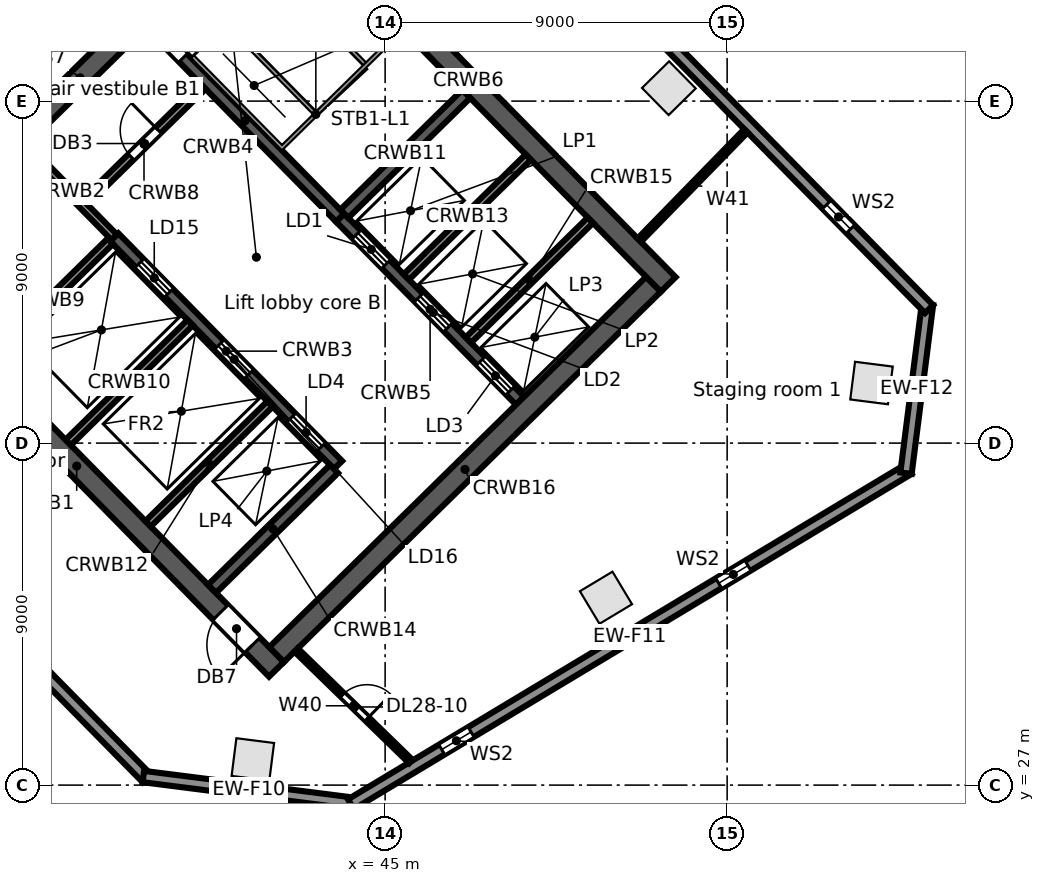
"""IFC4 building model, lengths in metres.
Left out: names, types, materials, properties, quantities, classifications, styles, units other than length and angle.
Written with IfcOpenShell. Run it as: python <this file> out.ifc"""

import sys

from ifc_helpers import new_model, si_unit, direction, frame, frame_2d, origin, origin_2d, place, context, subcontext, project, spatial, rectangle, extrude, element, fill, save


model = new_model("IFC4")
c1 = context("Model", 3, precision=1e-05, world=origin(), true_north=direction((0.0, 1.0)))
c2 = subcontext(c1, "Body", "Model", "MODEL_VIEW")
j1 = project(units=[si_unit("LENGTHUNIT", "METRE"), si_unit("PLANEANGLEUNIT", "RADIAN")], contexts=[c1])
p1 = place(None, origin())
s1 = spatial("IfcSite", under=j1, at=p1, CompositionType="ELEMENT")
p2 = place(p1, origin())
s2 = spatial("IfcBuilding", under=s1, at=p2, CompositionType="ELEMENT")
p3 = place(p2, frame((0.0, 0.0, 136.7)))
s3 = spatial("IfcBuildingStorey", under=s2, at=p3, CompositionType="ELEMENT", Elevation=136.7)
for number, where, z_axis, x_axis in (
    (1, (41.52, 27.675, 0.0), (0.0, 0.0, 1.0), (0.992, -0.126, 0.0)),
    (2, (50.812, 31.931, 0.0), (0.0, 0.0, 1.0), (0.857, 0.515, 0.0)),
    (3, (57.799, 37.581, 0.0), (0.0, 0.0, 1.0), (0.126, 0.992, 0.0)),
    (4, (52.467, 45.339, 0.0), (0.0, 0.0, 1.0), (-0.701, 0.713, 0.0)),
):
    element("IfcColumn", number, at=place(p3, frame(where, z_axis=z_axis, x_axis=x_axis)), inside=s3, PredefinedType="COLUMN", context=c2, shape_type="SweptSolid", body=[
        extrude(rectangle(XDim=1.0, YDim=1.0, at=origin_2d()), origin(), (0.0, 0.0, 1.0), 4.4),
    ])
p4 = place(p3, frame((38.727, 27.181, 0.0), z_axis=(0.0, 0.0, 1.0), x_axis=(-0.700906405975, 0.713253258011, 0.0)))
e5 = element("IfcWall", 5, at=p4, inside=s3, PredefinedType="STANDARD", context=c2, shape_type="SweptSolid", body=[
    extrude(rectangle(XDim=18.923, YDim=0.3, at=frame_2d((9.462, 0.0))), origin(), (0.0, 0.0, 1.0), 4.08),
])
p5 = place(p4, frame((14.967, 0.0, 0.6)))
e6 = element("IfcOpeningElement", 6, at=p5, cuts=e5, PredefinedType="OPENING", context=c2, shape_type="SweptSolid", body=[
    extrude(rectangle(XDim=0.9, YDim=2.8, at=frame_2d((0.45, 1.4))), frame((0.0, 0.16, 0.0), z_axis=(0.0, -1.0, 0.0), x_axis=(1.0, 0.0, 0.0)), (0.0, 0.0, 1.0), 0.32),
])
p6 = place(p4, frame((5.512, 0.0, 0.6)))
e7 = element("IfcOpeningElement", 7, at=p6, cuts=e5, PredefinedType="OPENING", context=c2, shape_type="SweptSolid", body=[
    extrude(rectangle(XDim=0.9, YDim=2.8, at=frame_2d((0.45, 1.4))), frame((0.0, 0.16, 0.0), z_axis=(0.0, -1.0, 0.0), x_axis=(1.0, 0.0, 0.0)), (0.0, 0.0, 1.0), 0.32),
])
p7 = place(p3, frame((44.196, 26.518, 0.0), z_axis=(0.0, 0.0, 1.0), x_axis=(-0.992001881269, 0.126223086474, 0.0)))
e8 = element("IfcWall", 8, at=p7, inside=s3, PredefinedType="STANDARD", context=c2, shape_type="SweptSolid", body=[
    extrude(rectangle(XDim=5.602, YDim=0.3, at=frame_2d((2.801, 0.0))), origin(), (0.0, 0.0, 1.0), 4.08),
])
p8 = place(p3, frame((58.778, 35.318, 0.0), z_axis=(0.0, 0.0, 1.0), x_axis=(-0.857168206138, -0.515036568009, 0.0)))
e9 = element("IfcWall", 9, at=p8, inside=s3, PredefinedType="STANDARD", context=c2, shape_type="SweptSolid", body=[
    extrude(rectangle(XDim=17.125, YDim=0.3, at=frame_2d((8.562, 0.0))), origin(), (0.0, 0.0, 1.0), 4.08),
])
p9 = place(p8, frame((13.435, 0.0, 0.6)))
e10 = element("IfcOpeningElement", 10, at=p9, cuts=e9, PredefinedType="OPENING", context=c2, shape_type="SweptSolid", body=[
    extrude(rectangle(XDim=0.9, YDim=2.8, at=frame_2d((0.45, 1.4))), frame((0.0, 0.16, 0.0), z_axis=(0.0, -1.0, 0.0), x_axis=(1.0, 0.0, 0.0)), (0.0, 0.0, 1.0), 0.32),
])
p10 = place(p8, frame((4.935, 0.0, 0.6)))
e11 = element("IfcOpeningElement", 11, at=p10, cuts=e9, PredefinedType="OPENING", context=c2, shape_type="SweptSolid", body=[
    extrude(rectangle(XDim=0.9, YDim=2.8, at=frame_2d((0.45, 1.4))), frame((0.0, 0.16, 0.0), z_axis=(0.0, -1.0, 0.0), x_axis=(1.0, 0.0, 0.0)), (0.0, 0.0, 1.0), 0.32),
])
p11 = place(p3, frame((59.272, 39.651, 0.0), z_axis=(0.0, 0.0, 1.0), x_axis=(-0.126181137886, -0.992007217938, 0.0)))
e12 = element("IfcWall", 12, at=p11, inside=s3, PredefinedType="STANDARD", context=c2, shape_type="SweptSolid", body=[
    extrude(rectangle(XDim=4.479, YDim=0.3, at=frame_2d((2.24, 0.0))), origin(), (0.0, 0.0, 1.0), 4.08),
])
p12 = place(p3, frame((40.594, 58.577, 0.0), z_axis=(0.0, 0.0, 1.0), x_axis=(0.700909719808, -0.713250001528, 0.0)))
e13 = element("IfcWall", 13, at=p12, inside=s3, PredefinedType="STANDARD", context=c2, shape_type="SweptSolid", body=[
    extrude(rectangle(XDim=26.708, YDim=0.3, at=frame_2d((13.354, 0.0))), origin(), (0.0, 0.0, 1.0), 4.08),
])
p13 = place(p12, frame((22.858, 0.0, 0.6)))
e14 = element("IfcOpeningElement", 14, at=p13, cuts=e13, PredefinedType="OPENING", context=c2, shape_type="SweptSolid", body=[
    extrude(rectangle(XDim=0.9, YDim=2.8, at=frame_2d((0.45, 1.4))), frame((0.0, 0.16, 0.0), z_axis=(0.0, -1.0, 0.0), x_axis=(1.0, 0.0, 0.0)), (0.0, 0.0, 1.0), 0.32),
])
p14 = place(p12, frame((13.987, 0.0, 0.6)))
e15 = element("IfcOpeningElement", 15, at=p14, cuts=e13, PredefinedType="OPENING", context=c2, shape_type="SweptSolid", body=[
    extrude(rectangle(XDim=0.9, YDim=2.8, at=frame_2d((0.45, 1.4))), frame((0.0, 0.16, 0.0), z_axis=(0.0, -1.0, 0.0), x_axis=(1.0, 0.0, 0.0)), (0.0, 0.0, 1.0), 0.32),
])
p15 = place(p12, frame((5.115, 0.0, 0.6)))
e16 = element("IfcOpeningElement", 16, at=p15, cuts=e13, PredefinedType="OPENING", context=c2, shape_type="SweptSolid", body=[
    extrude(rectangle(XDim=0.9, YDim=2.8, at=frame_2d((0.45, 1.4))), frame((0.0, 0.16, 0.0), z_axis=(0.0, -1.0, 0.0), x_axis=(1.0, 0.0, 0.0)), (0.0, 0.0, 1.0), 0.32),
])
p16 = place(p3, frame((31.628, 40.745, 0.0), z_axis=(0.0, 0.0, 1.0), x_axis=(0.700911255944, -0.713248491965, 0.0)))
e17 = element("IfcWall", 17, at=p16, inside=s3, PredefinedType="SOLIDWALL", context=c2, shape_type="SweptSolid", body=[
    extrude(rectangle(XDim=15.0, YDim=0.55, at=frame_2d((7.5, 0.0))), origin(), (0.0, 0.0, 1.0), 4.08),
])
p17 = place(p16, frame((12.9, 0.0, 0.0)))
e18 = element("IfcOpeningElement", 18, at=p17, cuts=e17, PredefinedType="OPENING", context=c2, shape_type="SweptSolid", body=[
    extrude(rectangle(XDim=1.2, YDim=2.1, at=frame_2d((0.6, 1.05))), frame((0.0, 0.285, 0.0), z_axis=(0.0, -1.0, 0.0), x_axis=(1.0, 0.0, 0.0)), (0.0, 0.0, 1.0), 0.57),
])
p18 = place(p3, frame((35.526, 43.805, 0.0), z_axis=(0.0, 0.0, 1.0), x_axis=(0.700884863746, -0.713274426691, 0.0)))
e19 = element("IfcWall", 19, at=p18, inside=s3, PredefinedType="SOLIDWALL", context=c2, shape_type="SweptSolid", body=[
    extrude(rectangle(XDim=3.35, YDim=0.2, at=frame_2d((1.675, 0.0))), origin(), (0.0, 0.0, 1.0), 4.08),
])
p19 = place(p3, frame((37.874, 41.416, 0.0), z_axis=(0.0, 0.0, 1.0), x_axis=(0.700918271237, -0.71324159795, 0.0)))
e20 = element("IfcWall", 20, at=p19, inside=s3, PredefinedType="SOLIDWALL", context=c2, shape_type="SweptSolid", body=[
    extrude(rectangle(XDim=8.4, YDim=0.3, at=frame_2d((4.2, 0.0))), origin(), (0.0, 0.0, 1.0), 4.08),
])
p20 = place(p19, frame((0.95, 0.0, 0.0)))
e21 = element("IfcOpeningElement", 21, at=p20, cuts=e20, PredefinedType="OPENING", context=c2, shape_type="SweptSolid", body=[
    extrude(rectangle(XDim=1.1, YDim=2.1, at=frame_2d((0.55, 1.05))), frame((0.0, 0.16, 0.0), z_axis=(0.0, -1.0, 0.0), x_axis=(1.0, 0.0, 0.0)), (0.0, 0.0, 1.0), 0.32),
])
p21 = place(p19, frame((3.95, 0.0, 0.0)))
e22 = element("IfcOpeningElement", 22, at=p21, cuts=e20, PredefinedType="OPENING", context=c2, shape_type="SweptSolid", body=[
    extrude(rectangle(XDim=1.1, YDim=2.1, at=frame_2d((0.55, 1.05))), frame((0.0, 0.16, 0.0), z_axis=(0.0, -1.0, 0.0), x_axis=(1.0, 0.0, 0.0)), (0.0, 0.0, 1.0), 0.32),
])
p22 = place(p19, frame((6.65, 0.0, 0.0)))
e23 = element("IfcOpeningElement", 23, at=p22, cuts=e20, PredefinedType="OPENING", context=c2, shape_type="SweptSolid", body=[
    extrude(rectangle(XDim=1.1, YDim=2.1, at=frame_2d((0.55, 1.05))), frame((0.0, 0.16, 0.0), z_axis=(0.0, -1.0, 0.0), x_axis=(1.0, 0.0, 0.0)), (0.0, 0.0, 1.0), 0.32),
])
p23 = place(p3, frame((38.807, 47.029, 0.0), z_axis=(0.0, 0.0, 1.0), x_axis=(0.700916852778, -0.713242991898, 0.0)))
e24 = element("IfcWall", 24, at=p23, inside=s3, PredefinedType="SOLIDWALL", context=c2, shape_type="SweptSolid", body=[
    extrude(rectangle(XDim=7.15, YDim=0.3, at=frame_2d((3.575, 0.0))), origin(), (0.0, 0.0, 1.0), 4.08),
])
p24 = place(p23, frame((0.25, 0.0, 0.0)))
e25 = element("IfcOpeningElement", 25, at=p24, cuts=e24, PredefinedType="OPENING", context=c2, shape_type="SweptSolid", body=[
    extrude(rectangle(XDim=1.0, YDim=2.1, at=frame_2d((0.5, 1.05))), frame((0.0, 0.16, 0.0), z_axis=(0.0, -1.0, 0.0), x_axis=(1.0, 0.0, 0.0)), (0.0, 0.0, 1.0), 0.32),
])
p25 = place(p3, frame((43.819, 41.929, 0.0), z_axis=(0.0, 0.0, 1.0), x_axis=(0.700931209592, -0.713228882912, 0.0)))
e26 = element("IfcWall", 26, at=p25, inside=s3, PredefinedType="SOLIDWALL", context=c2, shape_type="SweptSolid", body=[
    extrude(rectangle(XDim=6.75, YDim=0.3, at=frame_2d((3.375, 0.0))), origin(), (0.0, 0.0, 1.0), 4.08),
])
p26 = place(p25, frame((0.615, 0.0, 0.0)))
e27 = element("IfcOpeningElement", 27, at=p26, cuts=e26, PredefinedType="OPENING", context=c2, shape_type="SweptSolid", body=[
    extrude(rectangle(XDim=1.1, YDim=2.1, at=frame_2d((0.55, 1.05))), frame((0.0, 0.16, 0.0), z_axis=(0.0, -1.0, 0.0), x_axis=(1.0, 0.0, 0.0)), (0.0, 0.0, 1.0), 0.32),
])
p27 = place(p25, frame((2.945, 0.0, 0.0)))
e28 = element("IfcOpeningElement", 28, at=p27, cuts=e26, PredefinedType="OPENING", context=c2, shape_type="SweptSolid", body=[
    extrude(rectangle(XDim=1.1, YDim=2.1, at=frame_2d((0.55, 1.05))), frame((0.0, 0.16, 0.0), z_axis=(0.0, -1.0, 0.0), x_axis=(1.0, 0.0, 0.0)), (0.0, 0.0, 1.0), 0.32),
])
p28 = place(p25, frame((5.28, 0.0, 0.0)))
e29 = element("IfcOpeningElement", 29, at=p28, cuts=e26, PredefinedType="OPENING", context=c2, shape_type="SweptSolid", body=[
    extrude(rectangle(XDim=1.1, YDim=2.1, at=frame_2d((0.55, 1.05))), frame((0.0, 0.16, 0.0), z_axis=(0.0, -1.0, 0.0), x_axis=(1.0, 0.0, 0.0)), (0.0, 0.0, 1.0), 0.32),
])
p29 = place(p3, frame((41.934, 50.873, 0.0), z_axis=(0.0, 0.0, 1.0), x_axis=(0.700911255944, -0.713248491965, 0.0)))
e30 = element("IfcWall", 30, at=p29, inside=s3, PredefinedType="SOLIDWALL", context=c2, shape_type="SweptSolid", body=[
    extrude(rectangle(XDim=15.0, YDim=0.55, at=frame_2d((7.5, 0.0))), origin(), (0.0, 0.0, 1.0), 4.08),
])
p30 = place(p3, frame((32.017, 40.742, 0.0), z_axis=(0.0, 0.0, 1.0), x_axis=(0.713253550094, 0.700906108746, 0.0)))
e31 = element("IfcWall", 31, at=p30, inside=s3, PredefinedType="SOLIDWALL", context=c2, shape_type="SweptSolid", body=[
    extrude(rectangle(XDim=13.9, YDim=0.55, at=frame_2d((6.95, 0.0))), origin(), (0.0, 0.0, 1.0), 4.08),
])
p31 = place(p3, frame((37.104, 42.342, 0.0), z_axis=(0.0, 0.0, 1.0), x_axis=(0.713281298468, 0.700877870428, 0.0)))
e32 = element("IfcWall", 32, at=p31, inside=s3, PredefinedType="PARTITIONING", context=c2, shape_type="SweptSolid", body=[
    extrude(rectangle(XDim=4.35, YDim=0.2, at=frame_2d((2.175, 0.0))), origin(), (0.0, 0.0, 1.0), 4.08),
])
p32 = place(p31, frame((1.7, 0.0, 0.0)))
e33 = element("IfcOpeningElement", 33, at=p32, cuts=e32, PredefinedType="OPENING", context=c2, shape_type="SweptSolid", body=[
    extrude(rectangle(XDim=1.0, YDim=2.1, at=frame_2d((0.5, 1.05))), frame((0.0, 0.11, 0.0), z_axis=(0.0, -1.0, 0.0), x_axis=(1.0, 0.0, 0.0)), (0.0, 0.0, 1.0), 0.22),
])
p33 = place(p3, frame((34.558, 38.156, 0.0), z_axis=(0.0, 0.0, 1.0), x_axis=(0.713237924006, 0.700922009755, 0.0)))
e34 = element("IfcWall", 34, at=p33, inside=s3, PredefinedType="SOLIDWALL", context=c2, shape_type="SweptSolid", body=[
    extrude(rectangle(XDim=4.5, YDim=0.2, at=frame_2d((2.25, 0.0))), origin(), (0.0, 0.0, 1.0), 4.08),
])
p34 = place(p3, frame((36.66, 36.017, 0.0), z_axis=(0.0, 0.0, 1.0), x_axis=(0.713264577552, 0.700894886848, 0.0)))
e35 = element("IfcWall", 35, at=p34, inside=s3, PredefinedType="SOLIDWALL", context=c2, shape_type="SweptSolid", body=[
    extrude(rectangle(XDim=4.5, YDim=0.2, at=frame_2d((2.25, 0.0))), origin(), (0.0, 0.0, 1.0), 4.08),
])
p35 = place(p3, frame((43.926, 42.034, 0.0), z_axis=(0.0, 0.0, 1.0), x_axis=(0.713210801054, 0.700949608217, 0.0)))
e36 = element("IfcWall", 36, at=p35, inside=s3, PredefinedType="SOLIDWALL", context=c2, shape_type="SweptSolid", body=[
    extrude(rectangle(XDim=4.5, YDim=0.3, at=frame_2d((2.25, 0.0))), origin(), (0.0, 0.0, 1.0), 4.08),
])
p36 = place(p3, frame((38.763, 33.877, 0.0), z_axis=(0.0, 0.0, 1.0), x_axis=(0.713237455685, 0.700922486305, 0.0)))
e37 = element("IfcWall", 37, at=p36, inside=s3, PredefinedType="SOLIDWALL", context=c2, shape_type="SweptSolid", body=[
    extrude(rectangle(XDim=4.5, YDim=0.2, at=frame_2d((2.25, 0.0))), origin(), (0.0, 0.0, 1.0), 4.08),
])
p37 = place(p3, frame((45.559, 40.373, 0.0), z_axis=(0.0, 0.0, 1.0), x_axis=(0.713264577552, 0.700894886848, 0.0)))
e38 = element("IfcWall", 38, at=p37, inside=s3, PredefinedType="SOLIDWALL", context=c2, shape_type="SweptSolid", body=[
    extrude(rectangle(XDim=4.5, YDim=0.2, at=frame_2d((2.25, 0.0))), origin(), (0.0, 0.0, 1.0), 4.08),
])
p38 = place(p3, frame((40.445, 32.165, 0.0), z_axis=(0.0, 0.0, 1.0), x_axis=(0.713264577552, 0.700894886848, 0.0)))
e39 = element("IfcWall", 39, at=p38, inside=s3, PredefinedType="SOLIDWALL", context=c2, shape_type="SweptSolid", body=[
    extrude(rectangle(XDim=4.5, YDim=0.3, at=frame_2d((2.25, 0.0))), origin(), (0.0, 0.0, 1.0), 4.08),
])
p39 = place(p3, frame((47.192, 38.711, 0.0), z_axis=(0.0, 0.0, 1.0), x_axis=(0.713264577552, 0.700894886848, 0.0)))
e40 = element("IfcWall", 40, at=p39, inside=s3, PredefinedType="SOLIDWALL", context=c2, shape_type="SweptSolid", body=[
    extrude(rectangle(XDim=4.5, YDim=0.2, at=frame_2d((2.25, 0.0))), origin(), (0.0, 0.0, 1.0), 4.08),
])
p40 = place(p3, frame((42.145, 30.435, 0.0), z_axis=(0.0, 0.0, 1.0), x_axis=(0.713253550094, 0.700906108746, 0.0)))
e41 = element("IfcWall", 41, at=p40, inside=s3, PredefinedType="SOLIDWALL", context=c2, shape_type="SweptSolid", body=[
    extrude(rectangle(XDim=13.9, YDim=0.55, at=frame_2d((6.95, 0.0))), origin(), (0.0, 0.0, 1.0), 4.08),
])
p41 = place(p3, frame((42.659, 30.555, 0.0), z_axis=(0.0, 0.0, 1.0), x_axis=(0.716925671772, -0.697149611743, 0.0)))
e42 = element("IfcWall", 42, at=p41, inside=s3, PredefinedType="PARTITIONING", context=c2, shape_type="SweptSolid", body=[
    extrude(rectangle(XDim=4.21, YDim=0.125, at=frame_2d((2.105, 0.0))), origin(), (0.0, 0.0, 1.0), 3.352),
])
p42 = place(p41, frame((1.7, 0.0, 0.0)))
e43 = element("IfcOpeningElement", 43, at=p42, cuts=e42, PredefinedType="OPENING", context=c2, shape_type="SweptSolid", body=[
    extrude(rectangle(XDim=0.9, YDim=2.1, at=frame_2d((0.45, 1.05))), frame((0.0, 0.073, 0.0), z_axis=(0.0, -1.0, 0.0), x_axis=(1.0, 0.0, 0.0)), (0.0, 0.0, 1.0), 0.145),
])
p43 = place(p3, frame((51.688, 41.34, 0.0), z_axis=(0.0, 0.0, 1.0), x_axis=(0.698090794369, 0.716009247718, 0.0)))
e44 = element("IfcWall", 44, at=p43, inside=s3, PredefinedType="PARTITIONING", context=c2, shape_type="SweptSolid", body=[
    extrude(rectangle(XDim=4.019, YDim=0.125, at=frame_2d((2.01, 0.0))), origin(), (0.0, 0.0, 1.0), 3.36),
])
p44 = place(p9, origin())
e45 = element("IfcWindow", 45, at=p44, inside=s3, PartitioningType="SINGLE_PANEL", PredefinedType="WINDOW", context=c2, shape_type="SweptSolid", body=[
    extrude(rectangle(XDim=0.9, YDim=2.8, at=frame_2d((0.45, 1.4))), frame((0.0, 0.03, 0.0), z_axis=(0.0, -1.0, 0.0), x_axis=(1.0, 0.0, 0.0)), (0.0, 0.0, 1.0), 0.06),
])
fill(e10, e45)
p45 = place(p10, origin())
e46 = element("IfcWindow", 46, at=p45, inside=s3, PartitioningType="SINGLE_PANEL", PredefinedType="WINDOW", context=c2, shape_type="SweptSolid", body=[
    extrude(rectangle(XDim=0.9, YDim=2.8, at=frame_2d((0.45, 1.4))), frame((0.0, 0.03, 0.0), z_axis=(0.0, -1.0, 0.0), x_axis=(1.0, 0.0, 0.0)), (0.0, 0.0, 1.0), 0.06),
])
fill(e11, e46)
p46 = place(p13, origin())
e47 = element("IfcWindow", 47, at=p46, inside=s3, PartitioningType="SINGLE_PANEL", PredefinedType="WINDOW", context=c2, shape_type="SweptSolid", body=[
    extrude(rectangle(XDim=0.9, YDim=2.8, at=frame_2d((0.45, 1.4))), frame((0.0, 0.03, 0.0), z_axis=(0.0, -1.0, 0.0), x_axis=(1.0, 0.0, 0.0)), (0.0, 0.0, 1.0), 0.06),
])
fill(e14, e47)
p47 = place(p26, origin())
e48 = element("IfcDoor", 48, at=p47, inside=s3, OperationType="DOUBLE_DOOR_SLIDING", PredefinedType="DOOR", context=c2, shape_type="SweptSolid", body=[
    extrude(rectangle(XDim=1.1, YDim=2.1, at=frame_2d((0.55, 1.05))), frame((0.0, 0.025, 0.0), z_axis=(0.0, -1.0, 0.0), x_axis=(1.0, 0.0, 0.0)), (0.0, 0.0, 1.0), 0.05),
])
fill(e27, e48)
p48 = place(p27, origin())
e49 = element("IfcDoor", 49, at=p48, inside=s3, OperationType="DOUBLE_DOOR_SLIDING", PredefinedType="DOOR", context=c2, shape_type="SweptSolid", body=[
    extrude(rectangle(XDim=1.1, YDim=2.1, at=frame_2d((0.55, 1.05))), frame((0.0, 0.025, 0.0), z_axis=(0.0, -1.0, 0.0), x_axis=(1.0, 0.0, 0.0)), (0.0, 0.0, 1.0), 0.05),
])
fill(e28, e49)
p49 = place(p28, origin())
e50 = element("IfcDoor", 50, at=p49, inside=s3, OperationType="DOUBLE_DOOR_SLIDING", PredefinedType="DOOR", context=c2, shape_type="SweptSolid", body=[
    extrude(rectangle(XDim=1.1, YDim=2.1, at=frame_2d((0.55, 1.05))), frame((0.0, 0.025, 0.0), z_axis=(0.0, -1.0, 0.0), x_axis=(1.0, 0.0, 0.0)), (0.0, 0.0, 1.0), 0.05),
])
fill(e29, e50)
p50 = place(p20, origin())
e51 = element("IfcDoor", 51, at=p50, inside=s3, OperationType="DOUBLE_DOOR_SLIDING", PredefinedType="DOOR", context=c2, shape_type="SweptSolid", body=[
    extrude(rectangle(XDim=1.1, YDim=2.1, at=frame_2d((0.55, 1.05))), frame((0.0, 0.025, 0.0), z_axis=(0.0, -1.0, 0.0), x_axis=(1.0, 0.0, 0.0)), (0.0, 0.0, 1.0), 0.05),
])
fill(e21, e51)
p51 = place(p21, origin())
e52 = element("IfcDoor", 52, at=p51, inside=s3, OperationType="DOUBLE_DOOR_SLIDING", PredefinedType="DOOR", context=c2, shape_type="SweptSolid", body=[
    extrude(rectangle(XDim=1.1, YDim=2.1, at=frame_2d((0.55, 1.05))), frame((0.0, 0.025, 0.0), z_axis=(0.0, -1.0, 0.0), x_axis=(1.0, 0.0, 0.0)), (0.0, 0.0, 1.0), 0.05),
])
fill(e22, e52)
p52 = place(p22, origin())
e53 = element("IfcDoor", 53, at=p52, inside=s3, OperationType="DOUBLE_DOOR_SLIDING", PredefinedType="DOOR", context=c2, shape_type="SweptSolid", body=[
    extrude(rectangle(XDim=1.1, YDim=2.1, at=frame_2d((0.55, 1.05))), frame((0.0, 0.025, 0.0), z_axis=(0.0, -1.0, 0.0), x_axis=(1.0, 0.0, 0.0)), (0.0, 0.0, 1.0), 0.05),
])
fill(e23, e53)
p53 = place(p24, origin())
e54 = element("IfcDoor", 54, at=p53, inside=s3, OperationType="SINGLE_SWING_LEFT", PredefinedType="DOOR", context=c2, shape_type="SweptSolid", body=[
    extrude(rectangle(XDim=1.0, YDim=2.1, at=frame_2d((0.5, 1.05))), frame((0.0, 0.025, 0.0), z_axis=(0.0, -1.0, 0.0), x_axis=(1.0, 0.0, 0.0)), (0.0, 0.0, 1.0), 0.05),
])
fill(e25, e54)
p54 = place(p32, origin())
e55 = element("IfcDoor", 55, at=p54, inside=s3, OperationType="SINGLE_SWING_RIGHT", PredefinedType="DOOR", context=c2, shape_type="SweptSolid", body=[
    extrude(rectangle(XDim=1.0, YDim=2.1, at=frame_2d((0.5, 1.05))), frame((0.0, 0.025, 0.0), z_axis=(0.0, -1.0, 0.0), x_axis=(1.0, 0.0, 0.0)), (0.0, 0.0, 1.0), 0.05),
])
fill(e33, e55)
p55 = place(p17, frame((1.2, 0.0, 0.0), z_axis=(0.0, 0.0, 1.0), x_axis=(-1.0, 0.0, 0.0)))
e56 = element("IfcDoor", 56, at=p55, inside=s3, OperationType="SINGLE_SWING_LEFT", PredefinedType="DOOR", context=c2, shape_type="SweptSolid", body=[
    extrude(rectangle(XDim=1.2, YDim=2.1, at=frame_2d((0.6, 1.05))), frame((0.0, 0.025, 0.0), z_axis=(0.0, -1.0, 0.0), x_axis=(1.0, 0.0, 0.0)), (0.0, 0.0, 1.0), 0.05),
])
fill(e18, e56)
p56 = place(p42, origin())
e57 = element("IfcDoor", 57, at=p56, inside=s3, OperationType="SINGLE_SWING_RIGHT", PredefinedType="DOOR", context=c2, shape_type="SweptSolid", body=[
    extrude(rectangle(XDim=0.9, YDim=2.1, at=frame_2d((0.45, 1.05))), frame((0.0, 0.025, 0.0), z_axis=(0.0, -1.0, 0.0), x_axis=(1.0, 0.0, 0.0)), (0.0, 0.0, 1.0), 0.05),
])
fill(e43, e57)
save(model, sys.argv[1])
